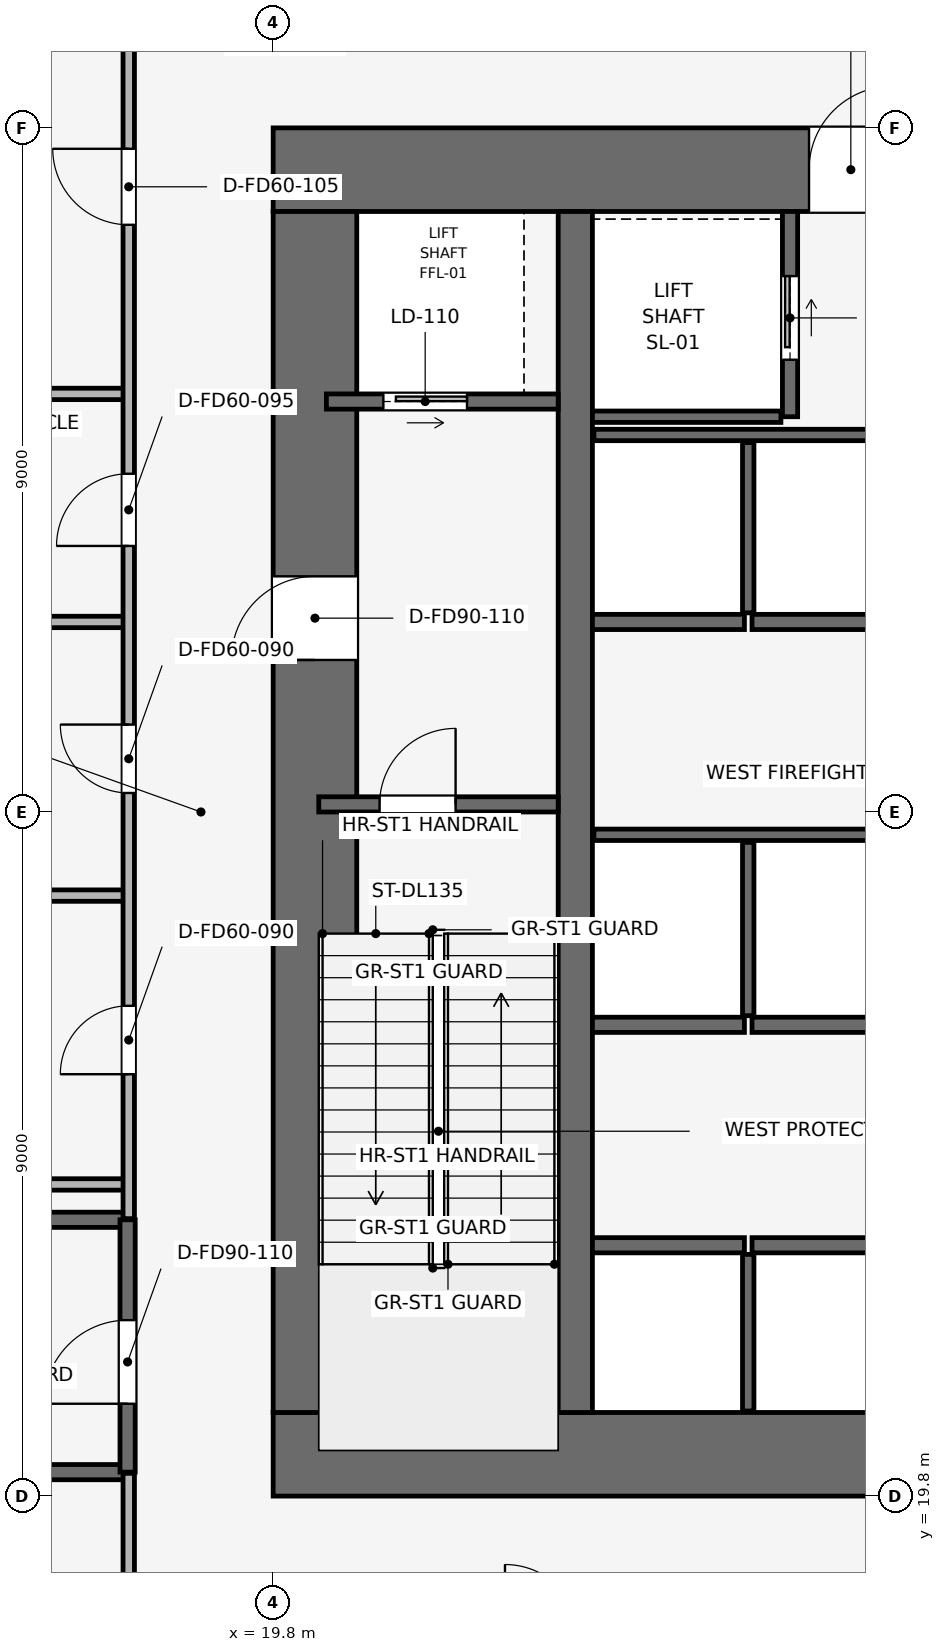
"""IFC4 building model, lengths in metres.
Left out: names, types, materials, properties, quantities, classifications, styles, units other than length and angle.
Written with IfcOpenShell. Run it as: python <this file> out.ifc"""

import sys

from ifc_helpers import new_model, si_unit, direction, frame, frame_2d, origin, place, context, subcontext, project, spatial, rectangle, extrude, element, fill, save


model = new_model("IFC4")
c1 = context("Model", 3, precision=1e-05, world=origin(), true_north=direction((0.0, 1.0)))
c2 = subcontext(c1, "Body", "Model", "MODEL_VIEW")
j1 = project(units=[si_unit("LENGTHUNIT", "METRE"), si_unit("PLANEANGLEUNIT", "RADIAN")], contexts=[c1])
p1 = place(None, origin())
s1 = spatial("IfcSite", under=j1, at=p1, CompositionType="ELEMENT")
p2 = place(p1, origin())
s2 = spatial("IfcBuilding", under=s1, at=p2, CompositionType="ELEMENT")
p3 = place(p2, frame((0.0, 0.0, 8.4)))
s3 = spatial("IfcBuildingStorey", under=s2, at=p3, CompositionType="ELEMENT", Elevation=8.4)
p4 = place(p3, frame((19.8, 20.35, 0.0), z_axis=(0.0, 0.0, 1.0), x_axis=(1.0, 0.0, 0.0)))
e1 = element("IfcWall", 1, at=p4, inside=s3, PredefinedType="SHEAR", context=c2, shape_type="SweptSolid", body=[
    extrude(rectangle(XDim=18.0, YDim=1.1, at=frame_2d((9.0, 0.0))), origin(), (0.0, 0.0, 1.0), 5.4),
])
p5 = place(p4, frame((8.4, 0.0, 0.0)))
e2 = element("IfcOpeningElement", 2, at=p5, cuts=e1, PredefinedType="OPENING", context=c2, shape_type="SweptSolid", body=[
    extrude(rectangle(XDim=1.2, YDim=2.2, at=frame_2d((0.6, 1.1))), frame((0.0, 0.56, 0.0), z_axis=(0.0, -1.0, 0.0), x_axis=(1.0, 0.0, 0.0)), (0.0, 0.0, 1.0), 1.12),
])
p6 = place(p3, frame((19.8, 37.25, 0.0), z_axis=(0.0, 0.0, 1.0), x_axis=(1.0, 0.0, 0.0)))
e3 = element("IfcWall", 3, at=p6, inside=s3, PredefinedType="SHEAR", context=c2, shape_type="SweptSolid", body=[
    extrude(rectangle(XDim=18.0, YDim=1.1, at=frame_2d((9.0, 0.0))), origin(), (0.0, 0.0, 1.0), 5.4),
])
p7 = place(p6, frame((7.05, 0.0, 0.0)))
e4 = element("IfcOpeningElement", 4, at=p7, cuts=e3, PredefinedType="OPENING", context=c2, shape_type="SweptSolid", body=[
    extrude(rectangle(XDim=1.1, YDim=2.15, at=frame_2d((0.55, 1.075))), frame((0.0, 0.56, 0.0), z_axis=(0.0, -1.0, 0.0), x_axis=(1.0, 0.0, 0.0)), (0.0, 0.0, 1.0), 1.12),
])
p8 = place(p3, frame((20.35, 20.9, 0.0), z_axis=(0.0, 0.0, 1.0), x_axis=(0.0, 1.0, 0.0)))
e5 = element("IfcWall", 5, at=p8, inside=s3, PredefinedType="SHEAR", context=c2, shape_type="SweptSolid", body=[
    extrude(rectangle(XDim=15.8, YDim=1.1, at=frame_2d((7.9, 0.0))), origin(), (0.0, 0.0, 1.0), 5.4),
])
p9 = place(p8, frame((9.9, 0.0, 0.0)))
e6 = element("IfcOpeningElement", 6, at=p9, cuts=e5, PredefinedType="OPENING", context=c2, shape_type="SweptSolid", body=[
    extrude(rectangle(XDim=1.1, YDim=2.15, at=frame_2d((0.55, 1.075))), frame((0.0, 0.56, 0.0), z_axis=(0.0, -1.0, 0.0), x_axis=(1.0, 0.0, 0.0)), (0.0, 0.0, 1.0), 1.12),
])
p10 = place(p3, frame((23.775, 20.9, 0.0), z_axis=(0.0, 0.0, 1.0), x_axis=(0.0, 1.0, 0.0)))
e7 = element("IfcWall", 7, at=p10, inside=s3, PredefinedType="SHEAR", context=c2, shape_type="SweptSolid", body=[
    extrude(rectangle(XDim=15.8, YDim=0.45, at=frame_2d((7.9, 0.0))), origin(), (0.0, 0.0, 1.0), 5.4),
])
p11 = place(p3, frame((20.4, 28.9, 0.0), z_axis=(0.0, 0.0, 1.0), x_axis=(1.0, 0.0, 0.0)))
e8 = element("IfcWall", 8, at=p11, inside=s3, PredefinedType="SHEAR", context=c2, shape_type="SweptSolid", body=[
    extrude(rectangle(XDim=3.15, YDim=0.2, at=frame_2d((1.575, 0.0))), origin(), (0.0, 0.0, 1.0), 5.05),
])
p12 = place(p11, frame((0.8, 0.0, 0.0)))
e9 = element("IfcOpeningElement", 9, at=p12, cuts=e8, PredefinedType="OPENING", context=c2, shape_type="SweptSolid", body=[
    extrude(rectangle(XDim=1.0, YDim=2.1, at=frame_2d((0.5, 1.05))), frame((0.0, 0.11, 0.0), z_axis=(0.0, -1.0, 0.0), x_axis=(1.0, 0.0, 0.0)), (0.0, 0.0, 1.0), 0.22),
])
p13 = place(p3, frame((20.5, 34.2, 0.0), z_axis=(0.0, 0.0, 1.0), x_axis=(1.0, 0.0, 0.0)))
e10 = element("IfcWall", 10, at=p13, inside=s3, PredefinedType="SHEAR", context=c2, shape_type="SweptSolid", body=[
    extrude(rectangle(XDim=3.05, YDim=0.2, at=frame_2d((1.525, 0.0))), origin(), (0.0, 0.0, 1.0), 5.05),
])
p14 = place(p13, frame((0.75, 0.0, 0.0)))
e11 = element("IfcOpeningElement", 11, at=p14, cuts=e10, PredefinedType="OPENING", context=c2, shape_type="SweptSolid", body=[
    extrude(rectangle(XDim=1.1, YDim=2.15, at=frame_2d((0.55, 1.075))), frame((0.0, 0.11, 0.0), z_axis=(0.0, -1.0, 0.0), x_axis=(1.0, 0.0, 0.0)), (0.0, 0.0, 1.0), 0.22),
])
p15 = place(p3, frame((26.6, 34.0, 0.0), z_axis=(0.0, 0.0, 1.0), x_axis=(0.0, 1.0, 0.0)))
e12 = element("IfcWall", 12, at=p15, inside=s3, PredefinedType="SHEAR", context=c2, shape_type="SweptSolid", body=[
    extrude(rectangle(XDim=2.7, YDim=0.2, at=frame_2d((1.35, 0.0))), origin(), (0.0, 0.0, 1.0), 5.05),
])
p16 = place(p15, frame((0.75, 0.0, 0.0)))
e13 = element("IfcOpeningElement", 13, at=p16, cuts=e12, PredefinedType="OPENING", context=c2, shape_type="SweptSolid", body=[
    extrude(rectangle(XDim=1.1, YDim=2.15, at=frame_2d((0.55, 1.075))), frame((0.0, 0.11, 0.0), z_axis=(0.0, -1.0, 0.0), x_axis=(1.0, 0.0, 0.0)), (0.0, 0.0, 1.0), 0.22),
])
p17 = place(p3, frame((24.0, 34.0, 0.0), z_axis=(0.0, 0.0, 1.0), x_axis=(1.0, 0.0, 0.0)))
e14 = element("IfcWall", 14, at=p17, inside=s3, PredefinedType="SHEAR", context=c2, shape_type="SweptSolid", body=[
    extrude(rectangle(XDim=2.48, YDim=0.15, at=frame_2d((1.24, 0.0))), origin(), (0.0, 0.0, 1.0), 5.05),
])
for number, where, z_axis, x_axis in (
    (15, (24.0, 23.1, 0.0), (0.0, 0.0, 1.0), (1.0, 0.0, 0.0)),
    (16, (26.1, 23.1, 0.0), (0.0, 0.0, 1.0), (1.0, 0.0, 0.0)),
    (17, (24.0, 26.0, 0.0), (0.0, 0.0, 1.0), (1.0, 0.0, 0.0)),
    (18, (26.1, 26.0, 0.0), (0.0, 0.0, 1.0), (1.0, 0.0, 0.0)),
    (19, (24.0, 31.3, 0.0), (0.0, 0.0, 1.0), (1.0, 0.0, 0.0)),
    (20, (26.1, 31.3, 0.0), (0.0, 0.0, 1.0), (1.0, 0.0, 0.0)),
):
    element("IfcWall", number, at=place(p3, frame(where, z_axis=z_axis, x_axis=x_axis)), inside=s3, PredefinedType="SHEAR", context=c2, shape_type="SweptSolid", body=[
        extrude(rectangle(XDim=2.0, YDim=0.2, at=frame_2d((1.0, 0.0))), origin(), (0.0, 0.0, 1.0), 5.05),
    ])
p18 = place(p3, frame((26.05, 20.92, 0.0), z_axis=(0.0, 0.0, 1.0), x_axis=(0.0, 1.0, 0.0)))
e21 = element("IfcWall", 21, at=p18, inside=s3, PredefinedType="SHEAR", context=c2, shape_type="SweptSolid", body=[
    extrude(rectangle(XDim=2.06, YDim=0.15, at=frame_2d((1.03, 0.0))), origin(), (0.0, 0.0, 1.0), 5.05),
])
p19 = place(p3, frame((24.02, 28.5, 0.0), z_axis=(0.0, 0.0, 1.0), x_axis=(1.0, 0.0, 0.0)))
e22 = element("IfcWall", 22, at=p19, inside=s3, PredefinedType="SHEAR", context=c2, shape_type="SweptSolid", body=[
    extrude(rectangle(XDim=4.08, YDim=0.15, at=frame_2d((2.04, 0.0))), origin(), (0.0, 0.0, 1.0), 5.05),
])
p20 = place(p3, frame((26.05, 26.12, 0.0), z_axis=(0.0, 0.0, 1.0), x_axis=(0.0, 1.0, 0.0)))
e23 = element("IfcWall", 23, at=p20, inside=s3, PredefinedType="SHEAR", context=c2, shape_type="SweptSolid", body=[
    extrude(rectangle(XDim=2.28, YDim=0.15, at=frame_2d((1.14, 0.0))), origin(), (0.0, 0.0, 1.0), 5.05),
])
p21 = place(p3, frame((24.02, 33.76, 0.0), z_axis=(0.0, 0.0, 1.0), x_axis=(1.0, 0.0, 0.0)))
e24 = element("IfcWall", 24, at=p21, inside=s3, PredefinedType="SHEAR", context=c2, shape_type="SweptSolid", body=[
    extrude(rectangle(XDim=4.08, YDim=0.15, at=frame_2d((2.04, 0.0))), origin(), (0.0, 0.0, 1.0), 5.05),
])
p22 = place(p3, frame((26.05, 31.42, 0.0), z_axis=(0.0, 0.0, 1.0), x_axis=(0.0, 1.0, 0.0)))
e25 = element("IfcWall", 25, at=p22, inside=s3, PredefinedType="SHEAR", context=c2, shape_type="SweptSolid", body=[
    extrude(rectangle(XDim=2.24, YDim=0.15, at=frame_2d((1.12, 0.0))), origin(), (0.0, 0.0, 1.0), 5.05),
])
for number, where, z_axis, x_axis in (
    (26, (9.315, 20.115, 0.0), (0.0, 0.0, 1.0), (1.0, 0.0, 0.0)),
    (27, (9.315, 23.435, 0.0), (0.0, 0.0, 1.0), (1.0, 0.0, 0.0)),
):
    element("IfcWall", number, at=place(p3, frame(where, z_axis=z_axis, x_axis=x_axis)), inside=s3, PredefinedType="SHEAR", context=c2, shape_type="SweptSolid", body=[
        extrude(rectangle(XDim=8.57, YDim=0.2, at=frame_2d((4.285, 0.0))), origin(), (0.0, 0.0, 1.0), 5.398),
    ])
p23 = place(p3, frame((17.885, 20.115, 0.0), z_axis=(0.0, 0.0, 1.0), x_axis=(0.0, 1.0, 0.0)))
e28 = element("IfcWall", 28, at=p23, inside=s3, PredefinedType="SHEAR", context=c2, shape_type="SweptSolid", body=[
    extrude(rectangle(XDim=3.32, YDim=0.2, at=frame_2d((1.66, 0.0))), origin(), (0.0, 0.0, 1.0), 5.398),
])
p24 = place(p23, frame((0.9, 0.0, 0.0)))
e29 = element("IfcOpeningElement", 29, at=p24, cuts=e28, PredefinedType="OPENING", context=c2, shape_type="SweptSolid", body=[
    extrude(rectangle(XDim=1.1, YDim=2.15, at=frame_2d((0.55, 1.075))), frame((0.0, 0.11, 0.0), z_axis=(0.0, -1.0, 0.0), x_axis=(1.0, 0.0, 0.0)), (0.0, 0.0, 1.0), 0.22),
])
for number, where, z_axis, x_axis in (
    (30, (13.1, 23.9, 0.0), (0.0, 0.0, 1.0), (1.0, 0.0, 0.0)),
    (31, (13.1, 34.3, 0.0), (0.0, 0.0, 1.0), (1.0, 0.0, 0.0)),
    (32, (13.1, 27.7, 0.0), (0.0, 0.0, 1.0), (1.0, 0.0, 0.0)),
    (33, (13.1, 31.3, 0.0), (0.0, 0.0, 1.0), (1.0, 0.0, 0.0)),
):
    element("IfcWall", number, at=place(p3, frame(where, z_axis=z_axis, x_axis=x_axis)), inside=s3, PredefinedType="PARTITIONING", context=c2, shape_type="SweptSolid", body=[
        extrude(rectangle(XDim=4.8, YDim=0.15, at=frame_2d((2.4, 0.0))), origin(), (0.0, 0.0, 1.0), 5.05),
    ])
p25 = place(p3, frame((17.9, 17.9, 0.0), z_axis=(0.0, 0.0, 1.0), x_axis=(0.0, 1.0, 0.0)))
e34 = element("IfcWall", 34, at=p25, inside=s3, PredefinedType="PARTITIONING", context=c2, shape_type="SweptSolid", body=[
    extrude(rectangle(XDim=2.2, YDim=0.15, at=frame_2d((1.1, 0.0))), origin(), (0.0, 0.0, 1.0), 5.05),
])
p26 = place(p3, frame((17.9, 23.45, 0.0), z_axis=(0.0, 0.0, 1.0), x_axis=(0.0, 1.0, 0.0)))
e35 = element("IfcWall", 35, at=p26, inside=s3, PredefinedType="PARTITIONING", context=c2, shape_type="SweptSolid", body=[
    extrude(rectangle(XDim=16.25, YDim=0.15, at=frame_2d((8.125, 0.0))), origin(), (0.0, 0.0, 1.0), 4.135),
])
p27 = place(p26, frame((1.9, 0.0, 0.0)))
e36 = element("IfcOpeningElement", 36, at=p27, cuts=e35, PredefinedType="OPENING", context=c2, shape_type="SweptSolid", body=[
    extrude(rectangle(XDim=0.9, YDim=2.1, at=frame_2d((0.45, 1.05))), frame((0.0, 0.085, 0.0), z_axis=(0.0, -1.0, 0.0), x_axis=(1.0, 0.0, 0.0)), (0.0, 0.0, 1.0), 0.17),
])
p28 = place(p26, frame((5.6, 0.0, 0.0)))
e37 = element("IfcOpeningElement", 37, at=p28, cuts=e35, PredefinedType="OPENING", context=c2, shape_type="SweptSolid", body=[
    extrude(rectangle(XDim=0.9, YDim=2.1, at=frame_2d((0.45, 1.05))), frame((0.0, 0.085, 0.0), z_axis=(0.0, -1.0, 0.0), x_axis=(1.0, 0.0, 0.0)), (0.0, 0.0, 1.0), 0.17),
])
p29 = place(p26, frame((8.85, 0.0, 0.0)))
e38 = element("IfcOpeningElement", 38, at=p29, cuts=e35, PredefinedType="OPENING", context=c2, shape_type="SweptSolid", body=[
    extrude(rectangle(XDim=0.95, YDim=2.1, at=frame_2d((0.475, 1.05))), frame((0.0, 0.085, 0.0), z_axis=(0.0, -1.0, 0.0), x_axis=(1.0, 0.0, 0.0)), (0.0, 0.0, 1.0), 0.17),
])
p30 = place(p26, frame((13.075, 0.0, 0.0)))
e39 = element("IfcOpeningElement", 39, at=p30, cuts=e35, PredefinedType="OPENING", context=c2, shape_type="SweptSolid", body=[
    extrude(rectangle(XDim=1.0, YDim=2.15, at=frame_2d((0.5, 1.075))), frame((0.0, 0.085, 0.0), z_axis=(0.0, -1.0, 0.0), x_axis=(1.0, 0.0, 0.0)), (0.0, 0.0, 1.0), 0.17),
])
p31 = place(p12, origin())
e40 = element("IfcDoor", 40, at=p31, inside=s3, OperationType="SINGLE_SWING_RIGHT", PredefinedType="DOOR", context=c2, shape_type="SweptSolid", body=[
    extrude(rectangle(XDim=1.0, YDim=2.1, at=frame_2d((0.5, 1.05))), frame((0.0, 0.025, 0.0), z_axis=(0.0, -1.0, 0.0), x_axis=(1.0, 0.0, 0.0)), (0.0, 0.0, 1.0), 0.05),
])
fill(e9, e40)
p32 = place(p14, origin())
e41 = element("IfcDoor", 41, at=p32, inside=s3, OperationType="SLIDING_TO_RIGHT", PredefinedType="DOOR", context=c2, shape_type="SweptSolid", body=[
    extrude(rectangle(XDim=1.1, YDim=2.15, at=frame_2d((0.55, 1.075))), frame((0.0, 0.025, 0.0), z_axis=(0.0, -1.0, 0.0), x_axis=(1.0, 0.0, 0.0)), (0.0, 0.0, 1.0), 0.05),
])
fill(e11, e41)
p33 = place(p16, origin())
e42 = element("IfcDoor", 42, at=p33, inside=s3, OperationType="SLIDING_TO_RIGHT", PredefinedType="DOOR", context=c2, shape_type="SweptSolid", body=[
    extrude(rectangle(XDim=1.1, YDim=2.15, at=frame_2d((0.55, 1.075))), frame((0.0, 0.025, 0.0), z_axis=(0.0, -1.0, 0.0), x_axis=(1.0, 0.0, 0.0)), (0.0, 0.0, 1.0), 0.05),
])
fill(e13, e42)
p34 = place(p24, origin())
e43 = element("IfcDoor", 43, at=p34, inside=s3, OperationType="SINGLE_SWING_LEFT", PredefinedType="DOOR", context=c2, shape_type="SweptSolid", body=[
    extrude(rectangle(XDim=1.1, YDim=2.15, at=frame_2d((0.55, 1.075))), frame((0.0, 0.025, 0.0), z_axis=(0.0, -1.0, 0.0), x_axis=(1.0, 0.0, 0.0)), (0.0, 0.0, 1.0), 0.05),
])
fill(e29, e43)
p35 = place(p27, origin())
e44 = element("IfcDoor", 44, at=p35, inside=s3, OperationType="SINGLE_SWING_LEFT", PredefinedType="DOOR", context=c2, shape_type="SweptSolid", body=[
    extrude(rectangle(XDim=0.9, YDim=2.1, at=frame_2d((0.45, 1.05))), frame((0.0, 0.025, 0.0), z_axis=(0.0, -1.0, 0.0), x_axis=(1.0, 0.0, 0.0)), (0.0, 0.0, 1.0), 0.05),
])
fill(e36, e44)
p36 = place(p28, origin())
e45 = element("IfcDoor", 45, at=p36, inside=s3, OperationType="SINGLE_SWING_RIGHT", PredefinedType="DOOR", context=c2, shape_type="SweptSolid", body=[
    extrude(rectangle(XDim=0.9, YDim=2.1, at=frame_2d((0.45, 1.05))), frame((0.0, 0.025, 0.0), z_axis=(0.0, -1.0, 0.0), x_axis=(1.0, 0.0, 0.0)), (0.0, 0.0, 1.0), 0.05),
])
fill(e37, e45)
p37 = place(p29, origin())
e46 = element("IfcDoor", 46, at=p37, inside=s3, OperationType="SINGLE_SWING_LEFT", PredefinedType="DOOR", context=c2, shape_type="SweptSolid", body=[
    extrude(rectangle(XDim=0.95, YDim=2.1, at=frame_2d((0.475, 1.05))), frame((0.0, 0.025, 0.0), z_axis=(0.0, -1.0, 0.0), x_axis=(1.0, 0.0, 0.0)), (0.0, 0.0, 1.0), 0.05),
])
fill(e38, e46)
p38 = place(p30, origin())
e47 = element("IfcDoor", 47, at=p38, inside=s3, OperationType="SINGLE_SWING_RIGHT", PredefinedType="DOOR", context=c2, shape_type="SweptSolid", body=[
    extrude(rectangle(XDim=1.0, YDim=2.15, at=frame_2d((0.5, 1.075))), frame((0.0, 0.025, 0.0), z_axis=(0.0, -1.0, 0.0), x_axis=(1.0, 0.0, 0.0)), (0.0, 0.0, 1.0), 0.05),
])
fill(e39, e47)
p39 = place(p9, origin())
e48 = element("IfcDoor", 48, at=p39, inside=s3, OperationType="SINGLE_SWING_LEFT", PredefinedType="DOOR", context=c2, shape_type="SweptSolid", body=[
    extrude(rectangle(XDim=1.1, YDim=2.15, at=frame_2d((0.55, 1.075))), frame((0.0, 0.025, 0.0), z_axis=(0.0, -1.0, 0.0), x_axis=(1.0, 0.0, 0.0)), (0.0, 0.0, 1.0), 0.05),
])
fill(e6, e48)
p40 = place(p7, origin())
e49 = element("IfcDoor", 49, at=p40, inside=s3, OperationType="SINGLE_SWING_RIGHT", PredefinedType="DOOR", context=c2, shape_type="SweptSolid", body=[
    extrude(rectangle(XDim=1.1, YDim=2.15, at=frame_2d((0.55, 1.075))), frame((0.0, 0.025, 0.0), z_axis=(0.0, -1.0, 0.0), x_axis=(1.0, 0.0, 0.0)), (0.0, 0.0, 1.0), 0.05),
])
fill(e4, e49)
save(model, sys.argv[1])
